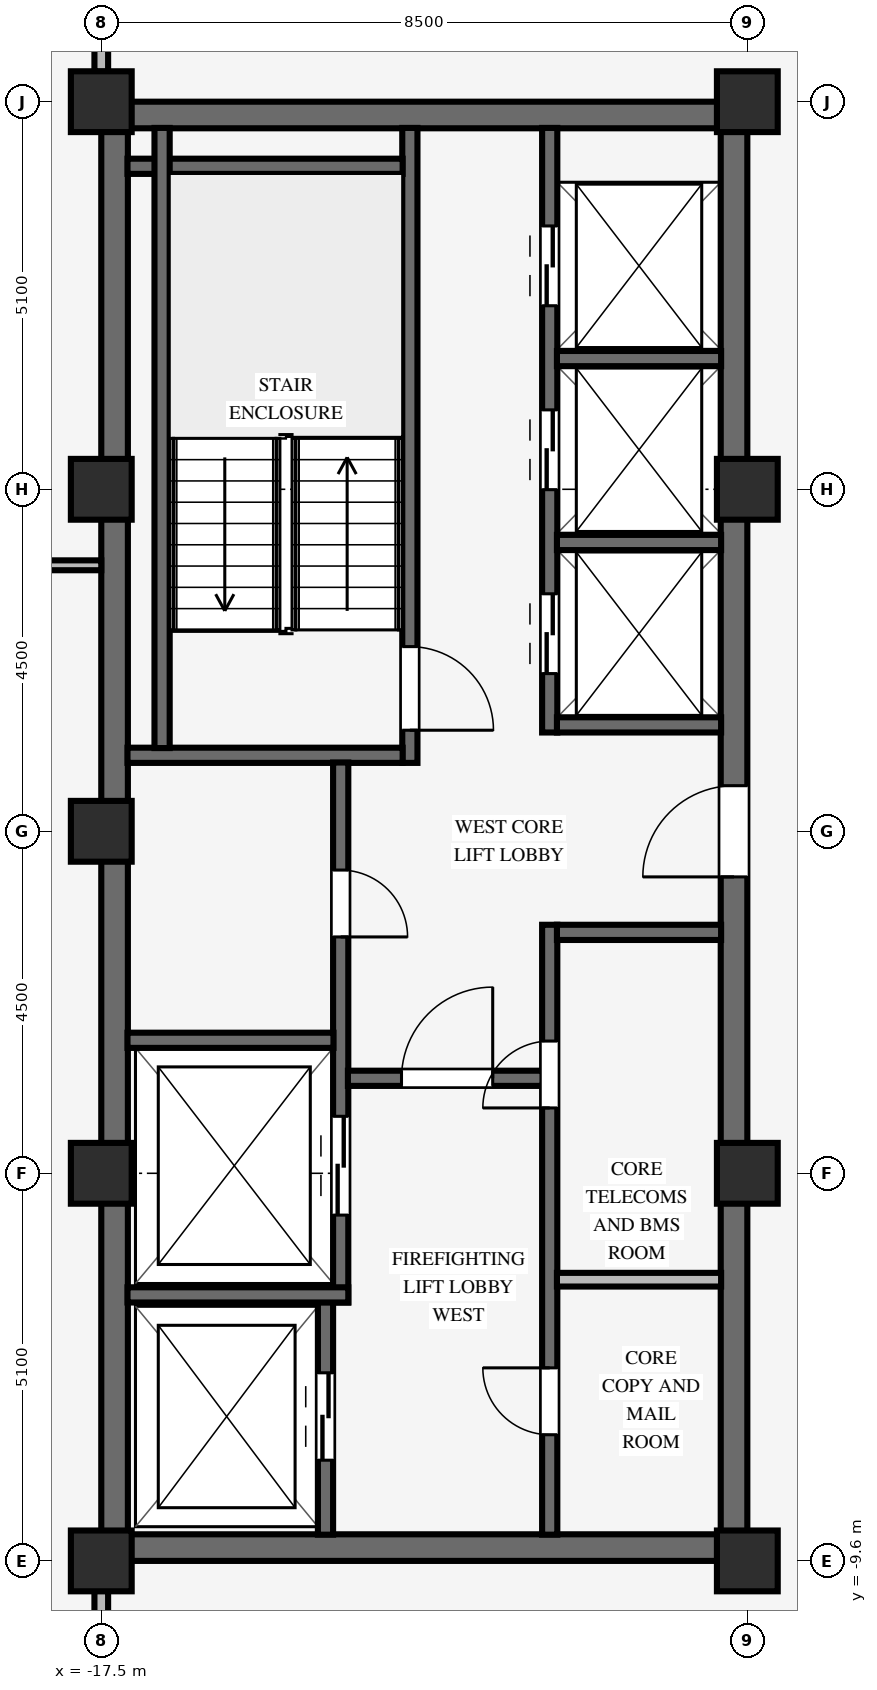
"""IFC4 building model, lengths in metres.
Left out: names, types, materials, properties, quantities, classifications, styles, units other than length and angle.
Written with IfcOpenShell. Run it as: python <this file> out.ifc"""

import sys

from ifc_helpers import new_model, si_unit, direction, frame, frame_2d, origin, origin_2d, place, context, subcontext, project, spatial, rectangle, extrude, source, transform, mapped, element, fill, save


model = new_model("IFC4")
c1 = context("Model", 3, precision=1e-05, world=origin(), true_north=direction((0.0, 1.0)))
c2 = subcontext(c1, "Body", "Model", "MODEL_VIEW")
j1 = project(units=[si_unit("LENGTHUNIT", "METRE"), si_unit("PLANEANGLEUNIT", "RADIAN")], contexts=[c1])
p1 = place(None, origin())
s1 = spatial("IfcSite", under=j1, at=p1, CompositionType="ELEMENT")
p2 = place(p1, origin())
s2 = spatial("IfcBuilding", under=s1, at=p2, CompositionType="ELEMENT")
p3 = place(p2, frame((0.0, 0.0, 265.25)))
s3 = spatial("IfcBuildingStorey", under=s2, at=p3, CompositionType="ELEMENT", Elevation=265.25)
for number, where, z_axis, x_axis in (
    (1, (-17.5, -9.425, 0.0), (0.0, 0.0, 1.0), (1.0, 0.0, 0.0)),
    (2, (-17.5, 9.425, 0.0), (0.0, 0.0, 1.0), (1.0, 0.0, 0.0)),
):
    element("IfcWall", number, at=place(p3, frame(where, z_axis=z_axis, x_axis=x_axis)), inside=s3, PredefinedType="SHEAR", context=c2, shape_type="SweptSolid", body=[
        extrude(rectangle(XDim=8.5, YDim=0.35, at=frame_2d((4.25, 0.0))), origin(), (0.0, 0.0, 1.0), 3.37),
    ])
p4 = place(p3, frame((-17.325, -9.255, 0.0), z_axis=(0.0, 0.0, 1.0), x_axis=(0.0, 1.0, 0.0)))
e3 = element("IfcWall", 3, at=p4, inside=s3, PredefinedType="SHEAR", context=c2, shape_type="SweptSolid", body=[
    extrude(rectangle(XDim=18.51, YDim=0.35, at=frame_2d((9.255, 0.0))), origin(), (0.0, 0.0, 1.0), 3.37),
])
p5 = place(p3, frame((-9.175, -9.255, 0.0), z_axis=(0.0, 0.0, 1.0), x_axis=(0.0, 1.0, 0.0)))
e4 = element("IfcWall", 4, at=p5, inside=s3, PredefinedType="SHEAR", context=c2, shape_type="SweptSolid", body=[
    extrude(rectangle(XDim=18.51, YDim=0.35, at=frame_2d((9.255, 0.0))), origin(), (0.0, 0.0, 1.0), 3.37),
])
p6 = place(p5, frame((8.655, 0.0, 0.0)))
e5 = element("IfcOpeningElement", 5, at=p6, cuts=e4, PredefinedType="OPENING", context=c2, shape_type="SweptSolid", body=[
    extrude(rectangle(XDim=1.2, YDim=2.15, at=frame_2d((0.6, 1.075))), frame((0.0, 0.185, 0.0), z_axis=(0.0, -1.0, 0.0), x_axis=(1.0, 0.0, 0.0)), (0.0, 0.0, 1.0), 0.37),
])
for number, where, z_axis, x_axis in (
    (6, (-17.5, -9.6, 0.0), (0.0, 0.0, 1.0), (1.0, 0.0, 0.0)),
    (7, (-17.5, -4.5, 0.0), (0.0, 0.0, 1.0), (1.0, 0.0, 0.0)),
    (8, (-17.5, 4.5, 0.0), (0.0, 0.0, 1.0), (1.0, 0.0, 0.0)),
    (9, (-17.5, 9.6, 0.0), (0.0, 0.0, 1.0), (1.0, 0.0, 0.0)),
    (10, (-9.0, -9.6, 0.0), (0.0, 0.0, 1.0), (1.0, 0.0, 0.0)),
    (11, (-9.0, -4.5, 0.0), (0.0, 0.0, 1.0), (1.0, 0.0, 0.0)),
    (12, (-9.0, 4.5, 0.0), (0.0, 0.0, 1.0), (1.0, 0.0, 0.0)),
    (13, (-9.0, 9.6, 0.0), (0.0, 0.0, 1.0), (1.0, 0.0, 0.0)),
    (14, (-17.5, 0.0, 0.0), (0.0, 0.0, 1.0), (1.0, 0.0, 0.0)),
):
    element("IfcColumn", number, at=place(p3, frame(where, z_axis=z_axis, x_axis=x_axis)), inside=s3, PredefinedType="COLUMN", context=c2, shape_type="SweptSolid", body=[
        extrude(rectangle(XDim=0.8, YDim=0.8, at=origin_2d()), origin(), (0.0, 0.0, 1.0), 3.37),
    ])
p7 = place(p3, frame((-13.44, 0.9, 0.0), z_axis=(0.0, 0.0, 1.0), x_axis=(0.0, 1.0, 0.0)))
e15 = element("IfcWall", 15, at=p7, inside=s3, PredefinedType="SHEAR", context=c2, shape_type="SweptSolid", body=[
    extrude(rectangle(XDim=8.355, YDim=0.2, at=frame_2d((4.177, 0.0))), origin(), (0.0, 0.0, 1.0), 3.37),
])
p8 = place(p7, frame((1.53, 0.0, 0.0), z_axis=(0.0, 0.0, 1.0), x_axis=(-1.0, 0.0, 0.0)))
e16 = element("IfcOpeningElement", 16, at=p8, cuts=e15, PredefinedType="OPENING", context=c2, shape_type="SweptSolid", body=[
    extrude(rectangle(XDim=1.1, YDim=2.15, at=frame_2d((0.55, 1.075))), frame((0.0, 0.11, 0.0), z_axis=(0.0, -1.0, 0.0), x_axis=(1.0, 0.0, 0.0)), (0.0, 0.0, 1.0), 0.22),
])
for number, where, z_axis, x_axis in (
    (17, (-17.155, 1.0, 0.0), (0.0, 0.0, 1.0), (1.0, 0.0, 0.0)),
    (18, (-17.155, 8.75, 0.0), (0.0, 0.0, 1.0), (1.0, 0.0, 0.0)),
):
    element("IfcWall", number, at=place(p3, frame(where, z_axis=z_axis, x_axis=x_axis)), inside=s3, PredefinedType="SHEAR", context=c2, shape_type="SweptSolid", body=[
        extrude(rectangle(XDim=3.62, YDim=0.2, at=frame_2d((1.81, 0.0))), origin(), (0.0, 0.0, 1.0), 3.37),
    ])
p9 = place(p3, frame((-16.7, 1.095, 0.0), z_axis=(0.0, 0.0, 1.0), x_axis=(0.0, 1.0, 0.0)))
e19 = element("IfcWall", 19, at=p9, inside=s3, PredefinedType="SHEAR", context=c2, shape_type="SweptSolid", body=[
    extrude(rectangle(XDim=8.16, YDim=0.2, at=frame_2d((4.08, 0.0))), origin(), (0.0, 0.0, 1.0), 3.37),
])
p10 = place(p3, frame((-14.55, -9.255, 0.0), z_axis=(0.0, 0.0, 1.0), x_axis=(0.0, 1.0, 0.0)))
e20 = element("IfcWall", 20, at=p10, inside=s3, PredefinedType="SHEAR", context=c2, shape_type="SweptSolid", body=[
    extrude(rectangle(XDim=3.06, YDim=0.2, at=frame_2d((1.53, 0.0))), origin(), (0.0, 0.0, 1.0), 3.37),
])
p11 = place(p10, frame((0.98, 0.0, 0.0)))
e21 = element("IfcOpeningElement", 21, at=p11, cuts=e20, PredefinedType="OPENING", context=c2, shape_type="SweptSolid", body=[
    extrude(rectangle(XDim=1.15, YDim=2.15, at=frame_2d((0.575, 1.075))), frame((0.0, 0.11, 0.0), z_axis=(0.0, -1.0, 0.0), x_axis=(1.0, 0.0, 0.0)), (0.0, 0.0, 1.0), 0.22),
])
p12 = place(p3, frame((-14.35, -6.2, 0.0), z_axis=(0.0, 0.0, 1.0), x_axis=(0.0, 1.0, 0.0)))
e22 = element("IfcWall", 22, at=p12, inside=s3, PredefinedType="SHEAR", context=c2, shape_type="SweptSolid", body=[
    extrude(rectangle(XDim=7.105, YDim=0.2, at=frame_2d((3.552, 0.0))), origin(), (0.0, 0.0, 1.0), 3.37),
])
p13 = place(p12, frame((5.69, 0.0, 0.0), z_axis=(0.0, 0.0, 1.0), x_axis=(-1.0, 0.0, 0.0)))
e23 = element("IfcOpeningElement", 23, at=p13, cuts=e22, PredefinedType="OPENING", context=c2, shape_type="SweptSolid", body=[
    extrude(rectangle(XDim=0.88, YDim=2.1, at=frame_2d((0.44, 1.05))), frame((0.0, 0.11, 0.0), z_axis=(0.0, -1.0, 0.0), x_axis=(1.0, 0.0, 0.0)), (0.0, 0.0, 1.0), 0.22),
])
p14 = place(p12, frame((1.15, 0.0, 0.0)))
e24 = element("IfcOpeningElement", 24, at=p14, cuts=e22, PredefinedType="OPENING", context=c2, shape_type="SweptSolid", body=[
    extrude(rectangle(XDim=1.3, YDim=2.2, at=frame_2d((0.65, 1.1))), frame((0.0, 0.11, 0.0), z_axis=(0.0, -1.0, 0.0), x_axis=(1.0, 0.0, 0.0)), (0.0, 0.0, 1.0), 0.22),
])
p15 = place(p3, frame((-17.155, -6.1, 0.0), z_axis=(0.0, 0.0, 1.0), x_axis=(1.0, 0.0, 0.0)))
e25 = element("IfcWall", 25, at=p15, inside=s3, PredefinedType="SHEAR", context=c2, shape_type="SweptSolid", body=[
    extrude(rectangle(XDim=2.905, YDim=0.2, at=frame_2d((1.453, 0.0))), origin(), (0.0, 0.0, 1.0), 3.37),
])
p16 = place(p3, frame((-17.155, -2.75, 0.0), z_axis=(0.0, 0.0, 1.0), x_axis=(1.0, 0.0, 0.0)))
e26 = element("IfcWall", 26, at=p16, inside=s3, PredefinedType="SHEAR", context=c2, shape_type="SweptSolid", body=[
    extrude(rectangle(XDim=2.71, YDim=0.2, at=frame_2d((1.355, 0.0))), origin(), (0.0, 0.0, 1.0), 3.37),
])
p17 = place(p3, frame((-11.6, -9.255, 0.0), z_axis=(0.0, 0.0, 1.0), x_axis=(0.0, 1.0, 0.0)))
e27 = element("IfcWall", 27, at=p17, inside=s3, PredefinedType="SHEAR", context=c2, shape_type="SweptSolid", body=[
    extrude(rectangle(XDim=8.025, YDim=0.2, at=frame_2d((4.012, 0.0))), origin(), (0.0, 0.0, 1.0), 3.37),
])
p18 = place(p17, frame((1.315, 0.0, 0.0)))
e28 = element("IfcOpeningElement", 28, at=p18, cuts=e27, PredefinedType="OPENING", context=c2, shape_type="SweptSolid", body=[
    extrude(rectangle(XDim=0.88, YDim=2.1, at=frame_2d((0.44, 1.05))), frame((0.0, 0.11, 0.0), z_axis=(0.0, -1.0, 0.0), x_axis=(1.0, 0.0, 0.0)), (0.0, 0.0, 1.0), 0.22),
])
p19 = place(p17, frame((5.615, 0.0, 0.0)))
e29 = element("IfcOpeningElement", 29, at=p19, cuts=e27, PredefinedType="OPENING", context=c2, shape_type="SweptSolid", body=[
    extrude(rectangle(XDim=0.88, YDim=2.1, at=frame_2d((0.44, 1.05))), frame((0.0, 0.11, 0.0), z_axis=(0.0, -1.0, 0.0), x_axis=(1.0, 0.0, 0.0)), (0.0, 0.0, 1.0), 0.22),
])
p20 = place(p3, frame((-14.255, -3.25, 0.0), z_axis=(0.0, 0.0, 1.0), x_axis=(1.0, 0.0, 0.0)))
e30 = element("IfcWall", 30, at=p20, inside=s3, PredefinedType="SHEAR", context=c2, shape_type="SweptSolid", body=[
    extrude(rectangle(XDim=2.56, YDim=0.2, at=frame_2d((1.28, 0.0))), origin(), (0.0, 0.0, 1.0), 3.37),
])
p21 = place(p20, frame((0.705, 0.0, 0.0)))
e31 = element("IfcOpeningElement", 31, at=p21, cuts=e30, PredefinedType="OPENING", context=c2, shape_type="SweptSolid", body=[
    extrude(rectangle(XDim=1.2, YDim=2.15, at=frame_2d((0.6, 1.075))), frame((0.0, 0.11, 0.0), z_axis=(0.0, -1.0, 0.0), x_axis=(1.0, 0.0, 0.0)), (0.0, 0.0, 1.0), 0.22),
])
p22 = place(p3, frame((-11.505, -1.33, 0.0), z_axis=(0.0, 0.0, 1.0), x_axis=(1.0, 0.0, 0.0)))
e32 = element("IfcWall", 32, at=p22, inside=s3, PredefinedType="SHEAR", context=c2, shape_type="SweptSolid", body=[
    extrude(rectangle(XDim=2.16, YDim=0.2, at=frame_2d((1.08, 0.0))), origin(), (0.0, 0.0, 1.0), 3.37),
])
p23 = place(p3, frame((-11.505, -5.9, 0.0), z_axis=(0.0, 0.0, 1.0), x_axis=(1.0, 0.0, 0.0)))
e33 = element("IfcWall", 33, at=p23, inside=s3, PredefinedType="PARTITIONING", context=c2, shape_type="SweptSolid", body=[
    extrude(rectangle(XDim=2.16, YDim=0.18, at=frame_2d((1.08, 0.0))), origin(), (0.0, 0.0, 1.0), 3.36),
])
p24 = place(p3, frame((-11.6, 1.3, 0.0), z_axis=(0.0, 0.0, 1.0), x_axis=(0.0, 1.0, 0.0)))
e34 = element("IfcWall", 34, at=p24, inside=s3, PredefinedType="SHEAR", context=c2, shape_type="SweptSolid", body=[
    extrude(rectangle(XDim=7.955, YDim=0.2, at=frame_2d((3.978, 0.0))), origin(), (0.0, 0.0, 1.0), 3.37),
])
p25 = place(p24, frame((0.775, 0.0, 0.0)))
e35 = element("IfcOpeningElement", 35, at=p25, cuts=e34, PredefinedType="OPENING", context=c2, shape_type="SweptSolid", body=[
    extrude(rectangle(XDim=1.05, YDim=2.15, at=frame_2d((0.525, 1.075))), frame((0.0, 0.11, 0.0), z_axis=(0.0, -1.0, 0.0), x_axis=(1.0, 0.0, 0.0)), (0.0, 0.0, 1.0), 0.22),
])
p26 = place(p24, frame((3.195, 0.0, 0.0)))
e36 = element("IfcOpeningElement", 36, at=p26, cuts=e34, PredefinedType="OPENING", context=c2, shape_type="SweptSolid", body=[
    extrude(rectangle(XDim=1.05, YDim=2.15, at=frame_2d((0.525, 1.075))), frame((0.0, 0.11, 0.0), z_axis=(0.0, -1.0, 0.0), x_axis=(1.0, 0.0, 0.0)), (0.0, 0.0, 1.0), 0.22),
])
p27 = place(p24, frame((5.615, 0.0, 0.0)))
e37 = element("IfcOpeningElement", 37, at=p27, cuts=e34, PredefinedType="OPENING", context=c2, shape_type="SweptSolid", body=[
    extrude(rectangle(XDim=1.05, YDim=2.15, at=frame_2d((0.525, 1.075))), frame((0.0, 0.11, 0.0), z_axis=(0.0, -1.0, 0.0), x_axis=(1.0, 0.0, 0.0)), (0.0, 0.0, 1.0), 0.22),
])
for number, where, z_axis, x_axis in (
    (38, (-11.505, 1.4, 0.0), (0.0, 0.0, 1.0), (1.0, 0.0, 0.0)),
    (39, (-11.505, 3.8, 0.0), (0.0, 0.0, 1.0), (1.0, 0.0, 0.0)),
    (40, (-11.505, 6.22, 0.0), (0.0, 0.0, 1.0), (1.0, 0.0, 0.0)),
):
    element("IfcWall", number, at=place(p3, frame(where, z_axis=z_axis, x_axis=x_axis)), inside=s3, PredefinedType="SHEAR", context=c2, shape_type="SweptSolid", body=[
        extrude(rectangle(XDim=2.16, YDim=0.2, at=frame_2d((1.08, 0.0))), origin(), (0.0, 0.0, 1.0), 3.37),
    ])
p28 = place(p3, frame((-20.7, 3.5, 0.0), z_axis=(0.0, 0.0, 1.0), x_axis=(1.0, 0.0, 0.0)))
e41 = element("IfcWall", 41, at=p28, inside=s3, PredefinedType="PARTITIONING", context=c2, shape_type="SweptSolid", body=[
    extrude(rectangle(XDim=3.2, YDim=0.13, at=frame_2d((1.6, 0.0))), origin(), (0.0, 0.0, 1.0), 3.36),
])
for number, where, z_axis, x_axis in (
    (42, (-17.5, -11.114, 0.0), (0.0, 0.0, 1.0), (0.0, 1.0, 0.0)),
    (43, (-17.5, 9.996, 0.0), (0.0, 0.0, 1.0), (0.0, 1.0, 0.0)),
):
    element("IfcWall", number, at=place(p3, frame(where, z_axis=z_axis, x_axis=x_axis)), inside=s3, PredefinedType="PARTITIONING", context=c2, shape_type="SweptSolid", body=[
        extrude(rectangle(XDim=1.118, YDim=0.18, at=frame_2d((0.559, 0.0))), origin(), (0.0, 0.0, 1.0), 2.892),
    ])
m1 = source(origin(), c2, "Body", "SweptSolid", [
    extrude(rectangle(XDim=1.1, YDim=2.15, at=frame_2d((0.55, 1.075))), frame((0.0, 0.025, 0.0), z_axis=(0.0, -1.0, 0.0), x_axis=(1.0, 0.0, 0.0)), (0.0, 0.0, 1.0), 0.05),
])
p29 = place(p8, origin())
e44 = element("IfcDoor", 44, at=p29, inside=s3, OperationType="SINGLE_SWING_RIGHT", PredefinedType="DOOR", context=c2, shape_type="MappedRepresentation", body=[
    mapped(m1, transform((0.0, 0.0, 0.0), scale=1.0)),
])
fill(e16, e44)
m2 = source(origin(), c2, "Body", "SweptSolid", [
    extrude(rectangle(XDim=0.88, YDim=2.1, at=frame_2d((0.44, 1.05))), frame((0.0, 0.025, 0.0), z_axis=(0.0, -1.0, 0.0), x_axis=(1.0, 0.0, 0.0)), (0.0, 0.0, 1.0), 0.05),
])
p30 = place(p13, origin())
e45 = element("IfcDoor", 45, at=p30, inside=s3, OperationType="SINGLE_SWING_RIGHT", PredefinedType="DOOR", context=c2, shape_type="MappedRepresentation", body=[
    mapped(m2, transform((0.0, 0.0, 0.0), scale=1.0)),
])
fill(e23, e45)
m3 = source(origin(), c2, "Body", "SweptSolid", [
    extrude(rectangle(XDim=1.2, YDim=2.15, at=frame_2d((0.6, 1.075))), frame((0.0, 0.025, 0.0), z_axis=(0.0, -1.0, 0.0), x_axis=(1.0, 0.0, 0.0)), (0.0, 0.0, 1.0), 0.05),
])
p31 = place(p21, origin())
e46 = element("IfcDoor", 46, at=p31, inside=s3, OperationType="SINGLE_SWING_RIGHT", PredefinedType="DOOR", context=c2, shape_type="MappedRepresentation", body=[
    mapped(m3, transform((0.0, 0.0, 0.0), scale=1.0)),
])
fill(e31, e46)
p32 = place(p18, origin())
e47 = element("IfcDoor", 47, at=p32, inside=s3, OperationType="SINGLE_SWING_RIGHT", PredefinedType="DOOR", context=c2, shape_type="MappedRepresentation", body=[
    mapped(m2, transform((0.0, 0.0, 0.0), scale=1.0)),
])
fill(e28, e47)
p33 = place(p19, origin())
e48 = element("IfcDoor", 48, at=p33, inside=s3, OperationType="SINGLE_SWING_LEFT", PredefinedType="DOOR", context=c2, shape_type="MappedRepresentation", body=[
    mapped(m2, transform((0.0, 0.0, 0.0), scale=1.0)),
])
fill(e29, e48)
p34 = place(p6, origin())
e49 = element("IfcDoor", 49, at=p34, inside=s3, OperationType="SINGLE_SWING_LEFT", PredefinedType="DOOR", context=c2, shape_type="MappedRepresentation", body=[
    mapped(m3, transform((0.0, 0.0, 0.0), scale=1.0)),
])
fill(e5, e49)
m4 = source(origin(), c2, "Body", "SweptSolid", [
    extrude(rectangle(XDim=1.15, YDim=2.15, at=frame_2d((0.575, 1.075))), frame((0.0, 0.025, 0.0), z_axis=(0.0, -1.0, 0.0), x_axis=(1.0, 0.0, 0.0)), (0.0, 0.0, 1.0), 0.05),
])
p35 = place(p11, origin())
e50 = element("IfcDoor", 50, at=p35, inside=s3, OperationType="DOUBLE_DOOR_SLIDING", PredefinedType="DOOR", context=c2, shape_type="MappedRepresentation", body=[
    mapped(m4, transform((0.0, 0.0, 0.0), scale=1.0)),
])
fill(e21, e50)
m5 = source(origin(), c2, "Body", "SweptSolid", [
    extrude(rectangle(XDim=1.3, YDim=2.2, at=frame_2d((0.65, 1.1))), frame((0.0, 0.025, 0.0), z_axis=(0.0, -1.0, 0.0), x_axis=(1.0, 0.0, 0.0)), (0.0, 0.0, 1.0), 0.05),
])
p36 = place(p14, origin())
e51 = element("IfcDoor", 51, at=p36, inside=s3, OperationType="DOUBLE_DOOR_SLIDING", PredefinedType="DOOR", context=c2, shape_type="MappedRepresentation", body=[
    mapped(m5, transform((0.0, 0.0, 0.0), scale=1.0)),
])
fill(e24, e51)
m6 = source(origin(), c2, "Body", "SweptSolid", [
    extrude(rectangle(XDim=1.05, YDim=2.15, at=frame_2d((0.525, 1.075))), frame((0.0, 0.025, 0.0), z_axis=(0.0, -1.0, 0.0), x_axis=(1.0, 0.0, 0.0)), (0.0, 0.0, 1.0), 0.05),
])
p37 = place(p25, origin())
e52 = element("IfcDoor", 52, at=p37, inside=s3, OperationType="DOUBLE_DOOR_SLIDING", PredefinedType="DOOR", context=c2, shape_type="MappedRepresentation", body=[
    mapped(m6, transform((0.0, 0.0, 0.0), scale=1.0)),
])
fill(e35, e52)
p38 = place(p26, origin())
e53 = element("IfcDoor", 53, at=p38, inside=s3, OperationType="DOUBLE_DOOR_SLIDING", PredefinedType="DOOR", context=c2, shape_type="MappedRepresentation", body=[
    mapped(m6, transform((0.0, 0.0, 0.0), scale=1.0)),
])
fill(e36, e53)
p39 = place(p27, origin())
e54 = element("IfcDoor", 54, at=p39, inside=s3, OperationType="DOUBLE_DOOR_SLIDING", PredefinedType="DOOR", context=c2, shape_type="MappedRepresentation", body=[
    mapped(m6, transform((0.0, 0.0, 0.0), scale=1.0)),
])
fill(e37, e54)
save(model, sys.argv[1])
